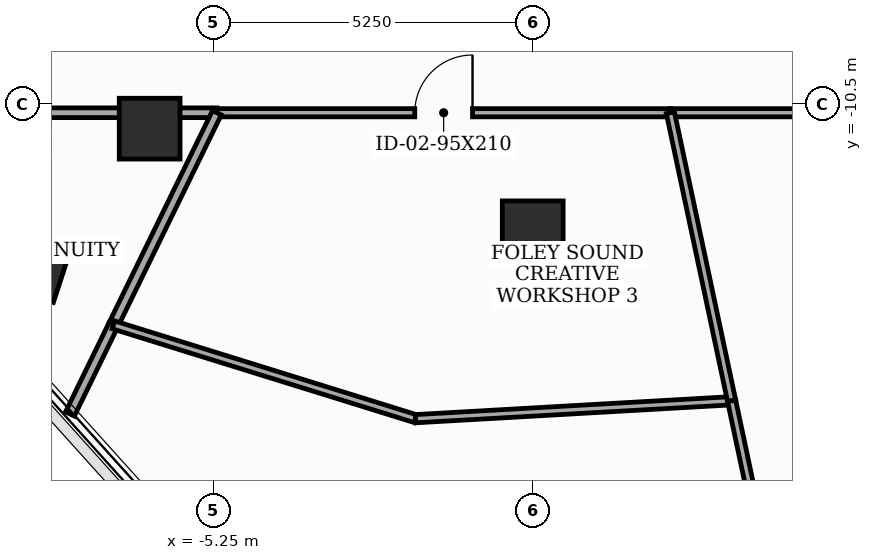
"""IFC4 building model, lengths in metres.
Left out: names, types, materials, properties, quantities, classifications, styles, units other than length and angle.
Written with IfcOpenShell. Run it as: python <this file> out.ifc"""

import sys

from ifc_helpers import new_model, si_unit, direction, frame, frame_2d, origin, origin_2d, place, context, subcontext, project, spatial, rectangle, extrude, element, fill, save


model = new_model("IFC4")
c1 = context("Model", 3, precision=1e-05, world=origin(), true_north=direction((0.0, 1.0)))
c2 = subcontext(c1, "Body", "Model", "MODEL_VIEW")
j1 = project(units=[si_unit("LENGTHUNIT", "METRE"), si_unit("PLANEANGLEUNIT", "RADIAN")], contexts=[c1])
p1 = place(None, origin())
s1 = spatial("IfcSite", under=j1, at=p1, CompositionType="ELEMENT")
p2 = place(p1, origin())
s2 = spatial("IfcBuilding", under=s1, at=p2, CompositionType="ELEMENT")
p3 = place(p2, frame((0.0, 0.0, 305.4)))
s3 = spatial("IfcBuildingStorey", under=s2, at=p3, CompositionType="ELEMENT", Elevation=305.4)
for number, where, z_axis, x_axis in (
    (1, (-6.3, -10.912, 0.0), (0.0, 0.0, 1.0), (1.0, 0.0, 0.0)),
    (2, (0.0, -12.6, 0.0), (0.0, 0.0, 1.0), (1.0, 0.0, 0.0)),
):
    element("IfcColumn", number, at=place(p3, frame(where, z_axis=z_axis, x_axis=x_axis)), inside=s3, PredefinedType="COLUMN", context=c2, shape_type="SweptSolid", body=[
        extrude(rectangle(XDim=1.0, YDim=1.0, at=origin_2d()), origin(), (0.0, 0.0, 1.0), 3.7),
    ])
p4 = place(p3, frame((-8.14, -13.266, 0.0), z_axis=(0.0, 0.0, 1.0), x_axis=(0.309016994375, 0.951056516295, 0.0)))
e3 = element("IfcColumn", 3, at=p4, inside=s3, PredefinedType="COLUMN", context=c2, shape_type="SweptSolid", body=[
    extrude(rectangle(XDim=0.8, YDim=0.8, at=origin_2d()), origin(), (0.0, 0.0, 1.0), 3.7),
])
p5 = place(p3, frame((-10.15, -10.65, 0.0), z_axis=(0.0, 0.0, 1.0), x_axis=(1.0, 0.0, 0.0)))
e4 = element("IfcWall", 4, at=p5, inside=s3, PredefinedType="PARTITIONING", context=c2, shape_type="SweptSolid", body=[
    extrude(rectangle(XDim=4.956, YDim=0.16, at=frame_2d((2.478, 0.0))), origin(), (0.0, 0.0, 1.0), 2.885),
])
p6 = place(p5, frame((0.491, 0.0, 0.0)))
e5 = element("IfcOpeningElement", 5, at=p6, cuts=e4, PredefinedType="OPENING", context=c2, shape_type="SweptSolid", body=[
    extrude(rectangle(XDim=1.0, YDim=2.15, at=frame_2d((0.5, 1.075))), frame((0.0, 0.09, 0.0), z_axis=(0.0, -1.0, 0.0), x_axis=(1.0, 0.0, 0.0)), (0.0, 0.0, 1.0), 0.18),
])
p7 = place(p3, frame((-5.194, -10.65, 0.0), z_axis=(0.0, 0.0, 1.0), x_axis=(1.0, 0.0, 0.0)))
e6 = element("IfcWall", 6, at=p7, inside=s3, PredefinedType="PARTITIONING", context=c2, shape_type="SweptSolid", body=[
    extrude(rectangle(XDim=7.458, YDim=0.135, at=frame_2d((3.729, 0.0))), origin(), (0.0, 0.0, 1.0), 2.885),
])
p8 = place(p7, frame((3.254, 0.0, 0.0)))
e7 = element("IfcOpeningElement", 7, at=p8, cuts=e6, PredefinedType="OPENING", context=c2, shape_type="SweptSolid", body=[
    extrude(rectangle(XDim=0.95, YDim=2.1, at=frame_2d((0.475, 1.05))), frame((0.0, 0.077, 0.0), z_axis=(0.0, -1.0, 0.0), x_axis=(1.0, 0.0, 0.0)), (0.0, 0.0, 1.0), 0.155),
])
p9 = place(p3, frame((2.264, -10.65, 0.0), z_axis=(0.0, 0.0, 1.0), x_axis=(1.0, 0.0, 0.0)))
e8 = element("IfcWall", 8, at=p9, inside=s3, PredefinedType="PARTITIONING", context=c2, shape_type="SweptSolid", body=[
    extrude(rectangle(XDim=7.886, YDim=0.135, at=frame_2d((3.943, 0.0))), origin(), (0.0, 0.0, 1.0), 2.885),
])
p10 = place(p3, frame((-6.896, -14.139, 0.0), z_axis=(0.0, 0.0, 1.0), x_axis=(0.438412480261, 0.898773885441, 0.0)))
e9 = element("IfcWall", 9, at=p10, inside=s3, PredefinedType="PARTITIONING", context=c2, shape_type="SweptSolid", body=[
    extrude(rectangle(XDim=3.882, YDim=0.16, at=frame_2d((1.941, 0.0))), origin(), (0.0, 0.0, 1.0), 2.885),
])
p11 = place(p3, frame((-7.61, -15.604, 0.0), z_axis=(0.0, 0.0, 1.0), x_axis=(0.438143244506, 0.898905165907, 0.0)))
e10 = element("IfcWall", 10, at=p11, inside=s3, PredefinedType="PARTITIONING", context=c2, shape_type="SweptSolid", body=[
    extrude(rectangle(XDim=1.63, YDim=0.16, at=frame_2d((0.815, 0.0))), origin(), (0.0, 0.0, 1.0), 3.035),
])
p12 = place(p3, frame((-6.896, -14.139, 0.0), z_axis=(0.0, 0.0, 1.0), x_axis=(0.955033449162, -0.296498079221, 0.0)))
e11 = element("IfcWall", 11, at=p12, inside=s3, PredefinedType="PARTITIONING", context=c2, shape_type="SweptSolid", body=[
    extrude(rectangle(XDim=5.204, YDim=0.135, at=frame_2d((2.602, 0.0))), origin(), (0.0, 0.0, 1.0), 3.5),
])
p13 = place(p3, frame((-1.926, -15.682, 0.0), z_axis=(0.0, 0.0, 1.0), x_axis=(0.998393696676, 0.056657095203, 0.0)))
e12 = element("IfcWall", 12, at=p13, inside=s3, PredefinedType="PARTITIONING", context=c2, shape_type="SweptSolid", body=[
    extrude(rectangle(XDim=5.205, YDim=0.135, at=frame_2d((2.603, 0.0))), origin(), (0.0, 0.0, 1.0), 3.035),
])
p14 = place(p3, frame((3.271, -15.387, 0.0), z_axis=(0.0, 0.0, 1.0), x_axis=(-0.207948590257, 0.978139756788, 0.0)))
e13 = element("IfcWall", 13, at=p14, inside=s3, PredefinedType="PARTITIONING", context=c2, shape_type="SweptSolid", body=[
    extrude(rectangle(XDim=4.843, YDim=0.135, at=frame_2d((2.421, 0.0))), origin(), (0.0, 0.0, 1.0), 2.885),
])
p15 = place(p3, frame((5.994, -28.2, 0.0), z_axis=(0.0, 0.0, 1.0), x_axis=(-0.207854966288, 0.978159656186, 0.0)))
e14 = element("IfcWall", 14, at=p15, inside=s3, PredefinedType="PARTITIONING", context=c2, shape_type="SweptSolid", body=[
    extrude(rectangle(XDim=13.099, YDim=0.135, at=frame_2d((6.549, 0.0))), origin(), (0.0, 0.0, 1.0), 3.035),
])
p16 = place(p15, frame((6.089, 0.0, 0.0)))
e15 = element("IfcOpeningElement", 15, at=p16, cuts=e14, PredefinedType="OPENING", context=c2, shape_type="SweptSolid", body=[
    extrude(rectangle(XDim=0.92, YDim=2.1, at=frame_2d((0.46, 1.05))), frame((0.0, 0.077, 0.0), z_axis=(0.0, -1.0, 0.0), x_axis=(1.0, 0.0, 0.0)), (0.0, 0.0, 1.0), 0.155),
])
p17 = place(p8, origin())
e16 = element("IfcDoor", 16, at=p17, inside=s3, OperationType="SINGLE_SWING_RIGHT", PredefinedType="DOOR", context=c2, shape_type="SweptSolid", body=[
    extrude(rectangle(XDim=0.95, YDim=2.1, at=frame_2d((0.475, 1.05))), frame((0.0, 0.025, 0.0), z_axis=(0.0, -1.0, 0.0), x_axis=(1.0, 0.0, 0.0)), (0.0, 0.0, 1.0), 0.05),
])
fill(e7, e16)
save(model, sys.argv[1])
